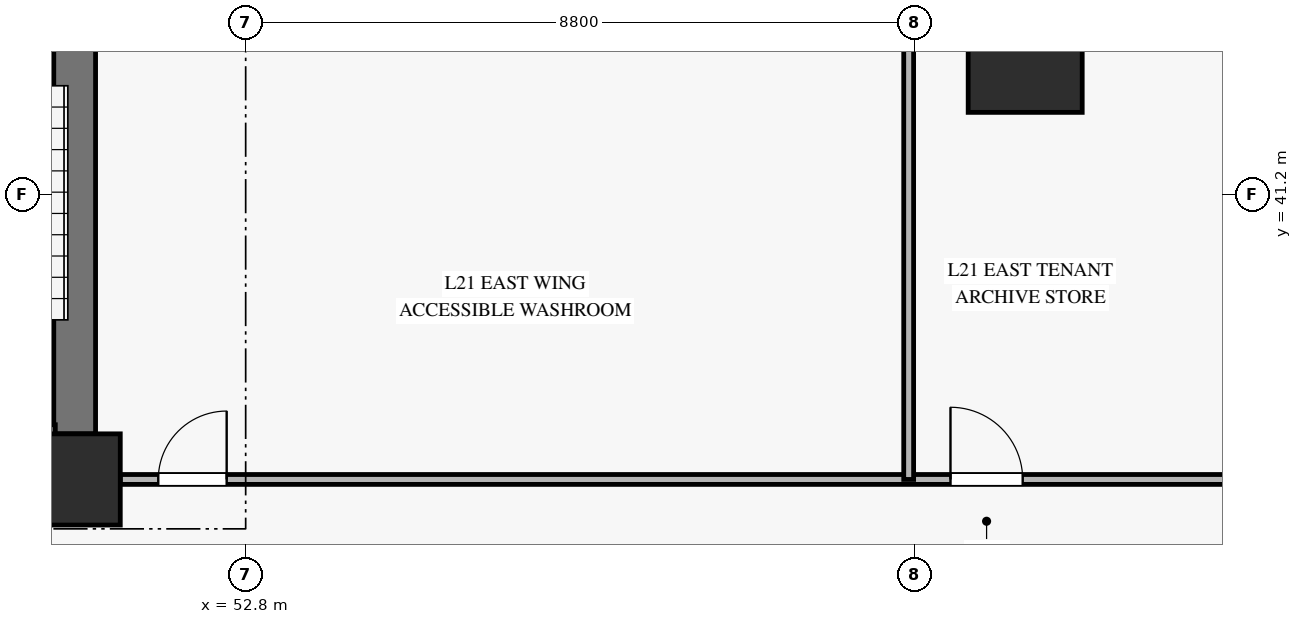
"""IFC4 building model, lengths in metres.
Left out: names, types, materials, properties, quantities, classifications, styles, units other than length and angle.
Written with IfcOpenShell. Run it as: python <this file> out.ifc"""

import sys

from ifc_helpers import new_model, si_unit, direction, frame, frame_2d, origin, origin_2d, place, context, subcontext, project, spatial, rectangle, hollow_rectangle, extrude, source, transform, mapped, element, fill, save


model = new_model("IFC4")
c1 = context("Model", 3, precision=1e-05, world=origin(), true_north=direction((0.0, 1.0)))
c2 = subcontext(c1, "Body", "Model", "MODEL_VIEW")
j1 = project(units=[si_unit("LENGTHUNIT", "METRE"), si_unit("PLANEANGLEUNIT", "RADIAN")], contexts=[c1])
p1 = place(None, origin())
s1 = spatial("IfcSite", under=j1, at=p1, CompositionType="ELEMENT")
p2 = place(p1, origin())
s2 = spatial("IfcBuilding", under=s1, at=p2, CompositionType="ELEMENT")
p3 = place(p2, frame((0.0, 0.0, 87.4)))
s3 = spatial("IfcBuildingStorey", under=s2, at=p3, CompositionType="ELEMENT", Elevation=87.4)
m1 = source(origin(), c2, "Body", "SweptSolid", [
    extrude(rectangle(XDim=1.2, YDim=1.2, at=origin_2d()), origin(), (0.0, 0.0, 1.0), 3.68),
])
p4 = place(p3, frame((50.55, 37.45, 0.0), z_axis=(0.0, 0.0, 1.0), x_axis=(1.0, 0.0, 0.0)))
e1 = element("IfcColumn", 1, at=p4, inside=s3, PredefinedType="PILASTER", context=c2, shape_type="MappedRepresentation", body=[
    mapped(m1, transform((0.0, 0.0, 0.0), x_axis=(1.0, 0.0, 0.0), y_axis=(0.0, 1.0, 0.0), z_axis=(0.0, 0.0, 1.0), scale=1.0)),
])
p5 = place(p3, frame((50.55, 38.05, 0.0), z_axis=(0.0, 0.0, 1.0), x_axis=(0.0, 1.0, 0.0)))
e2 = element("IfcWall", 2, at=p5, inside=s3, PredefinedType="SHEAR", context=c2, shape_type="SweptSolid", body=[
    extrude(rectangle(XDim=7.9, YDim=0.55, at=frame_2d((3.95, 0.0))), origin(), (0.0, 0.0, 1.0), 3.68),
])
m2 = source(origin(), c2, "Body", "SweptSolid", [
    extrude(hollow_rectangle(XDim=1.5, YDim=1.5, WallThickness=0.07, at=origin_2d()), origin(), (0.0, 0.0, 1.0), 3.68),
])
p6 = place(p3, frame((63.056, 43.03, 0.0), z_axis=(0.0, 0.0, 1.0), x_axis=(1.0, 0.0, 0.0)))
e3 = element("IfcColumn", 3, at=p6, inside=s3, PredefinedType="COLUMN", context=c2, shape_type="MappedRepresentation", body=[
    mapped(m2, transform((0.0, 0.0, 0.0), x_axis=(1.0, 0.0, 0.0), y_axis=(0.0, 1.0, 0.0), z_axis=(0.0, 0.0, 1.0), scale=1.0)),
])
p7 = place(p3, frame((66.126, 43.03, 0.0), z_axis=(0.0, 0.0, 1.0), x_axis=(-0.623820223262, 0.781567865926, 0.0)))
e4 = element("IfcWall", 4, at=p7, inside=s3, PredefinedType="SOLIDWALL", context=c2, shape_type="SweptSolid", body=[
    extrude(rectangle(XDim=4.12, YDim=0.3, at=frame_2d((2.06, 0.0))), origin(), (0.0, 0.0, 1.0), 3.16),
])
p8 = place(p7, frame((1.26, 0.0, 0.45)))
e5 = element("IfcOpeningElement", 5, at=p8, cuts=e4, PredefinedType="OPENING", context=c2, shape_type="SweptSolid", body=[
    extrude(rectangle(XDim=1.6, YDim=2.0, at=frame_2d((0.8, 1.0))), frame((0.0, 0.16, 0.0), z_axis=(0.0, -1.0, 0.0), x_axis=(1.0, 0.0, 0.0)), (0.0, 0.0, 1.0), 0.32),
])
p9 = place(p3, frame((47.44, 38.07, 0.0), z_axis=(0.0, 0.0, 1.0), x_axis=(1.0, 0.0, 0.0)))
e6 = element("IfcWall", 6, at=p9, inside=s3, PredefinedType="SOLIDWALL", context=c2, shape_type="SweptSolid", body=[
    extrude(rectangle(XDim=2.855, YDim=0.2, at=frame_2d((1.427, 0.0))), origin(), (0.0, 0.0, 1.0), 3.9),
])
p10 = place(p3, frame((51.15, 37.45, 0.0), z_axis=(0.0, 0.0, 1.0), x_axis=(1.0, 0.0, 0.0)))
e7 = element("IfcWall", 7, at=p10, inside=s3, PredefinedType="PARTITIONING", context=c2, shape_type="SweptSolid", body=[
    extrude(rectangle(XDim=14.976, YDim=0.13, at=frame_2d((7.488, 0.0))), origin(), (0.0, 0.0, 1.0), 3.165),
])
p11 = place(p10, frame((0.5, 0.0, 0.0)))
e8 = element("IfcOpeningElement", 8, at=p11, cuts=e7, PredefinedType="OPENING", context=c2, shape_type="SweptSolid", body=[
    extrude(rectangle(XDim=0.9, YDim=2.1, at=frame_2d((0.45, 1.05))), frame((0.0, 0.075, 0.0), z_axis=(0.0, -1.0, 0.0), x_axis=(1.0, 0.0, 0.0)), (0.0, 0.0, 1.0), 0.15),
])
p12 = place(p10, frame((10.923, 0.0, 0.0)))
e9 = element("IfcOpeningElement", 9, at=p12, cuts=e7, PredefinedType="OPENING", context=c2, shape_type="SweptSolid", body=[
    extrude(rectangle(XDim=0.95, YDim=2.1, at=frame_2d((0.475, 1.05))), frame((0.0, 0.075, 0.0), z_axis=(0.0, -1.0, 0.0), x_axis=(1.0, 0.0, 0.0)), (0.0, 0.0, 1.0), 0.15),
])
p13 = place(p3, frame((61.523, 37.45, 0.0), z_axis=(0.0, 0.0, 1.0), x_axis=(0.0, 1.0, 0.0)))
e10 = element("IfcWall", 10, at=p13, inside=s3, PredefinedType="PARTITIONING", context=c2, shape_type="SweptSolid", body=[
    extrude(rectangle(XDim=8.8, YDim=0.13, at=frame_2d((4.4, 0.0))), origin(), (0.0, 0.0, 1.0), 3.68),
])
m3 = source(origin(), c2, "Body", "SweptSolid", [
    extrude(rectangle(XDim=0.9, YDim=2.1, at=frame_2d((0.45, 1.05))), frame((0.0, 0.025, 0.0), z_axis=(0.0, -1.0, 0.0), x_axis=(1.0, 0.0, 0.0)), (0.0, 0.0, 1.0), 0.05),
])
p14 = place(p11, origin())
e11 = element("IfcDoor", 11, at=p14, inside=s3, OperationType="SINGLE_SWING_RIGHT", PredefinedType="DOOR", context=c2, shape_type="MappedRepresentation", body=[
    mapped(m3, transform((0.0, 0.0, 0.0), x_axis=(1.0, 0.0, 0.0), y_axis=(0.0, 1.0, 0.0), z_axis=(0.0, 0.0, 1.0), scale=1.0)),
])
fill(e8, e11)
m4 = source(origin(), c2, "Body", "SweptSolid", [
    extrude(rectangle(XDim=0.95, YDim=2.1, at=frame_2d((0.475, 1.05))), frame((0.0, 0.025, 0.0), z_axis=(0.0, -1.0, 0.0), x_axis=(1.0, 0.0, 0.0)), (0.0, 0.0, 1.0), 0.05),
])
p15 = place(p12, origin())
e12 = element("IfcDoor", 12, at=p15, inside=s3, OperationType="SINGLE_SWING_LEFT", PredefinedType="DOOR", context=c2, shape_type="MappedRepresentation", body=[
    mapped(m4, transform((0.0, 0.0, 0.0), x_axis=(1.0, 0.0, 0.0), y_axis=(0.0, 1.0, 0.0), z_axis=(0.0, 0.0, 1.0), scale=1.0)),
])
fill(e9, e12)
save(model, sys.argv[1])
